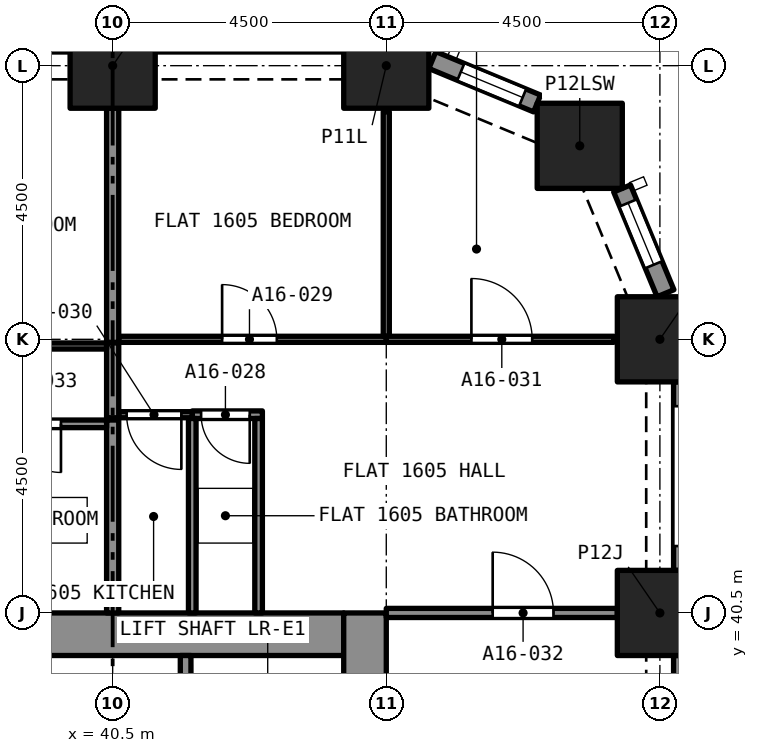
"""IFC4 building model, lengths in metres.
Left out: names, types, materials, properties, quantities, classifications, styles, units other than length and angle.
Written with IfcOpenShell. Run it as: python <this file> out.ifc"""

import sys

from ifc_helpers import new_model, si_unit, direction, frame, frame_2d, origin, origin_2d, place, context, subcontext, project, spatial, rectangle, extrude, element, fill, save


model = new_model("IFC4")
c1 = context("Model", 3, precision=1e-05, world=origin(), true_north=direction((0.0, 1.0)))
c2 = subcontext(c1, "Body", "Model", "MODEL_VIEW")
j1 = project(units=[si_unit("LENGTHUNIT", "METRE"), si_unit("PLANEANGLEUNIT", "RADIAN")], contexts=[c1])
p1 = place(None, origin())
s1 = spatial("IfcSite", under=j1, at=p1, CompositionType="ELEMENT")
p2 = place(p1, origin())
s2 = spatial("IfcBuilding", under=s1, at=p2, CompositionType="ELEMENT")
p3 = place(p2, frame((0.0, 0.0, 62.4)))
s3 = spatial("IfcBuildingStorey", under=s2, at=p3, CompositionType="ELEMENT", Elevation=62.4)
for number, where, z_axis, x_axis in (
    (1, (49.5, 40.5, 0.0), (0.0, 0.0, 1.0), (1.0, 0.0, 0.0)),
    (2, (49.5, 45.0, 0.0), (0.0, 0.0, 1.0), (1.0, 0.0, 0.0)),
    (3, (48.182, 48.182, 0.0), (0.0, 0.0, 1.0), (1.0, 0.0, 0.0)),
    (4, (40.5, 49.5, 0.0), (0.0, 0.0, 1.0), (1.0, 0.0, 0.0)),
    (5, (45.0, 49.5, 0.0), (0.0, 0.0, 1.0), (1.0, 0.0, 0.0)),
):
    element("IfcColumn", number, at=place(p3, frame(where, z_axis=z_axis, x_axis=x_axis)), inside=s3, PredefinedType="COLUMN", context=c2, shape_type="SweptSolid", body=[
        extrude(rectangle(XDim=1.4, YDim=1.4, at=origin_2d()), origin(), (0.0, 0.0, 1.0), 3.2),
    ])
p4 = place(p3, frame((36.7, 40.15, 0.0), z_axis=(0.0, 0.0, 1.0), x_axis=(1.0, 0.0, 0.0)))
e6 = element("IfcWall", 6, at=p4, inside=s3, PredefinedType="SOLIDWALL", context=c2, shape_type="SweptSolid", body=[
    extrude(rectangle(XDim=7.6, YDim=0.7, at=frame_2d((3.8, 0.0))), origin(), (0.0, 0.0, 1.0), 3.2),
])
p5 = place(p3, frame((44.65, 27.0, 0.0), z_axis=(0.0, 0.0, 1.0), x_axis=(0.0, 1.0, 0.0)))
e7 = element("IfcWall", 7, at=p5, inside=s3, PredefinedType="SOLIDWALL", context=c2, shape_type="SweptSolid", body=[
    extrude(rectangle(XDim=13.5, YDim=0.7, at=frame_2d((6.75, 0.0))), origin(), (0.0, 0.0, 1.0), 3.2),
])
p6 = place(p5, frame((8.95, 0.0, 0.0)))
e8 = element("IfcOpeningElement", 8, at=p6, cuts=e7, PredefinedType="OPENING", context=c2, shape_type="SweptSolid", body=[
    extrude(rectangle(XDim=1.2, YDim=2.1, at=frame_2d((0.6, 1.05))), frame((0.0, 0.36, 0.0), z_axis=(0.0, -1.0, 0.0), x_axis=(1.0, 0.0, 0.0)), (0.0, 0.0, 1.0), 0.72),
])
p7 = place(p3, frame((49.875, 39.8, 0.0), z_axis=(0.0, 0.0, 1.0), x_axis=(0.0, -1.0, 0.0)))
e9 = element("IfcWall", 9, at=p7, inside=s3, PredefinedType="SOLIDWALL", context=c2, shape_type="SweptSolid", body=[
    extrude(rectangle(XDim=3.1, YDim=0.3, at=frame_2d((1.55, 0.0))), origin(), (0.0, 0.0, 1.0), 3.2),
])
p8 = place(p7, frame((0.4, 0.0, 0.45)))
e10 = element("IfcOpeningElement", 10, at=p8, cuts=e9, PredefinedType="OPENING", context=c2, shape_type="SweptSolid", body=[
    extrude(rectangle(XDim=2.3, YDim=1.95, at=frame_2d((1.15, 0.975))), frame((0.0, 0.16, 0.0), z_axis=(0.0, -1.0, 0.0), x_axis=(1.0, 0.0, 0.0)), (0.0, 0.0, 1.0), 0.32),
])
p9 = place(p3, frame((49.875, 44.3, 0.0), z_axis=(0.0, 0.0, 1.0), x_axis=(0.0, -1.0, 0.0)))
e11 = element("IfcWall", 11, at=p9, inside=s3, PredefinedType="SOLIDWALL", context=c2, shape_type="SweptSolid", body=[
    extrude(rectangle(XDim=3.1, YDim=0.3, at=frame_2d((1.55, 0.0))), origin(), (0.0, 0.0, 1.0), 3.2),
])
p10 = place(p9, frame((0.4, 0.0, 0.45)))
e12 = element("IfcOpeningElement", 12, at=p10, cuts=e11, PredefinedType="OPENING", context=c2, shape_type="SweptSolid", body=[
    extrude(rectangle(XDim=2.3, YDim=1.95, at=frame_2d((1.15, 0.975))), frame((0.0, 0.16, 0.0), z_axis=(0.0, -1.0, 0.0), x_axis=(1.0, 0.0, 0.0)), (0.0, 0.0, 1.0), 0.32),
])
p11 = place(p3, frame((48.878, 47.48, 0.0), z_axis=(0.0, 0.0, 1.0), x_axis=(0.38262540684, -0.923903565336, 0.0)))
e13 = element("IfcWall", 13, at=p11, inside=s3, PredefinedType="SOLIDWALL", context=c2, shape_type="SweptSolid", body=[
    extrude(rectangle(XDim=1.865, YDim=0.3, at=frame_2d((0.933, 0.0))), origin(), (0.0, 0.0, 1.0), 3.2),
])
p12 = place(p11, frame((0.258, 0.0, 0.45)))
e14 = element("IfcOpeningElement", 14, at=p12, cuts=e13, PredefinedType="OPENING", context=c2, shape_type="SweptSolid", body=[
    extrude(rectangle(XDim=1.1, YDim=1.95, at=frame_2d((0.55, 0.975))), frame((0.0, 0.16, 0.0), z_axis=(0.0, -1.0, 0.0), x_axis=(1.0, 0.0, 0.0)), (0.0, 0.0, 1.0), 0.32),
])
p13 = place(p3, frame((45.757, 49.592, 0.0), z_axis=(0.0, 0.0, 1.0), x_axis=(0.923857286003, -0.382737135771, 0.0)))
e15 = element("IfcWall", 15, at=p13, inside=s3, PredefinedType="SOLIDWALL", context=c2, shape_type="SweptSolid", body=[
    extrude(rectangle(XDim=1.865, YDim=0.3, at=frame_2d((0.933, 0.0))), origin(), (0.0, 0.0, 1.0), 3.2),
])
p14 = place(p13, frame((0.508, 0.0, 0.45)))
e16 = element("IfcOpeningElement", 16, at=p14, cuts=e15, PredefinedType="OPENING", context=c2, shape_type="SweptSolid", body=[
    extrude(rectangle(XDim=1.1, YDim=1.95, at=frame_2d((0.55, 0.975))), frame((0.0, 0.16, 0.0), z_axis=(0.0, -1.0, 0.0), x_axis=(1.0, 0.0, 0.0)), (0.0, 0.0, 1.0), 0.32),
])
p15 = place(p3, frame((42.962, 43.76, 0.0), z_axis=(0.0, 0.0, 1.0), x_axis=(-1.0, 0.0, 0.0)))
e17 = element("IfcWall", 17, at=p15, inside=s3, PredefinedType="PARTITIONING", context=c2, shape_type="SweptSolid", body=[
    extrude(rectangle(XDim=1.153, YDim=0.125, at=frame_2d((0.577, 0.0))), origin(), (0.0, 0.0, 1.0), 2.9),
])
p16 = place(p15, frame((0.208, 0.0, 0.0)))
e18 = element("IfcOpeningElement", 18, at=p16, cuts=e17, PredefinedType="OPENING", context=c2, shape_type="SweptSolid", body=[
    extrude(rectangle(XDim=0.8, YDim=2.1, at=frame_2d((0.4, 1.05))), frame((0.0, 0.073, 0.0), z_axis=(0.0, -1.0, 0.0), x_axis=(1.0, 0.0, 0.0)), (0.0, 0.0, 1.0), 0.145),
])
for number, where, z_axis, x_axis in (
    (19, (42.9, 40.5, 0.0), (0.0, 0.0, 1.0), (0.0, 1.0, 0.0)),
    (20, (41.809, 40.5, 0.0), (0.0, 0.0, 1.0), (0.0, 1.0, 0.0)),
):
    element("IfcWall", number, at=place(p3, frame(where, z_axis=z_axis, x_axis=x_axis)), inside=s3, PredefinedType="PARTITIONING", context=c2, shape_type="SweptSolid", body=[
        extrude(rectangle(XDim=3.198, YDim=0.125, at=frame_2d((1.599, 0.0))), origin(), (0.0, 0.0, 1.0), 2.9),
    ])
p17 = place(p3, frame((40.6, 45.0, 0.0), z_axis=(0.0, 0.0, 1.0), x_axis=(1.0, 0.0, 0.0)))
e21 = element("IfcWall", 21, at=p17, inside=s3, PredefinedType="PARTITIONING", context=c2, shape_type="SweptSolid", body=[
    extrude(rectangle(XDim=4.4, YDim=0.1, at=frame_2d((2.2, 0.0))), origin(), (0.0, 0.0, 1.0), 2.9),
])
p18 = place(p17, frame((1.7, 0.0, 0.0)))
e22 = element("IfcOpeningElement", 22, at=p18, cuts=e21, PredefinedType="OPENING", context=c2, shape_type="SweptSolid", body=[
    extrude(rectangle(XDim=0.9, YDim=2.1, at=frame_2d((0.45, 1.05))), frame((0.0, 0.06, 0.0), z_axis=(0.0, -1.0, 0.0), x_axis=(1.0, 0.0, 0.0)), (0.0, 0.0, 1.0), 0.12),
])
p19 = place(p3, frame((45.0, 45.05, 0.0), z_axis=(0.0, 0.0, 1.0), x_axis=(0.0, 1.0, 0.0)))
e23 = element("IfcWall", 23, at=p19, inside=s3, PredefinedType="PARTITIONING", context=c2, shape_type="SweptSolid", body=[
    extrude(rectangle(XDim=3.692, YDim=0.1, at=frame_2d((1.846, 0.0))), origin(), (0.0, 0.0, 1.0), 2.9),
])
p20 = place(p3, frame((40.5, 44.95, 0.0), z_axis=(0.0, 0.0, 1.0), x_axis=(0.0, 1.0, 0.0)))
e24 = element("IfcWall", 24, at=p20, inside=s3, PredefinedType="PARTITIONING", context=c2, shape_type="SweptSolid", body=[
    extrude(rectangle(XDim=3.85, YDim=0.2, at=frame_2d((1.925, 0.0))), origin(), (0.0, 0.0, 1.0), 2.9),
])
p21 = place(p3, frame((41.809, 43.76, 0.0), z_axis=(0.0, 0.0, 1.0), x_axis=(-1.0, 0.0, 0.0)))
e25 = element("IfcWall", 25, at=p21, inside=s3, PredefinedType="PARTITIONING", context=c2, shape_type="SweptSolid", body=[
    extrude(rectangle(XDim=1.209, YDim=0.1, at=frame_2d((0.604, 0.0))), origin(), (0.0, 0.0, 1.0), 2.9),
])
p22 = place(p21, frame((0.179, 0.0, 0.0)))
e26 = element("IfcOpeningElement", 26, at=p22, cuts=e25, PredefinedType="OPENING", context=c2, shape_type="SweptSolid", body=[
    extrude(rectangle(XDim=0.9, YDim=2.1, at=frame_2d((0.45, 1.05))), frame((0.0, 0.06, 0.0), z_axis=(0.0, -1.0, 0.0), x_axis=(1.0, 0.0, 0.0)), (0.0, 0.0, 1.0), 0.12),
])
p23 = place(p3, frame((45.0, 45.0, 0.0), z_axis=(0.0, 0.0, 1.0), x_axis=(1.0, 0.0, 0.0)))
e27 = element("IfcWall", 27, at=p23, inside=s3, PredefinedType="PARTITIONING", context=c2, shape_type="SweptSolid", body=[
    extrude(rectangle(XDim=3.742, YDim=0.1, at=frame_2d((1.871, 0.0))), origin(), (0.0, 0.0, 1.0), 2.9),
])
p24 = place(p23, frame((1.4, 0.0, 0.0)))
e28 = element("IfcOpeningElement", 28, at=p24, cuts=e27, PredefinedType="OPENING", context=c2, shape_type="SweptSolid", body=[
    extrude(rectangle(XDim=1.0, YDim=2.1, at=frame_2d((0.5, 1.05))), frame((0.0, 0.06, 0.0), z_axis=(0.0, -1.0, 0.0), x_axis=(1.0, 0.0, 0.0)), (0.0, 0.0, 1.0), 0.12),
])
p25 = place(p3, frame((40.5, 43.71, 0.0), z_axis=(0.0, 0.0, 1.0), x_axis=(0.0, 1.0, 0.0)))
e29 = element("IfcWall", 29, at=p25, inside=s3, PredefinedType="PARTITIONING", context=c2, shape_type="SweptSolid", body=[
    extrude(rectangle(XDim=1.23, YDim=0.2, at=frame_2d((0.615, 0.0))), origin(), (0.0, 0.0, 1.0), 2.9),
])
p26 = place(p3, frame((45.0, 40.5, 0.0), z_axis=(0.0, 0.0, 1.0), x_axis=(1.0, 0.0, 0.0)))
e30 = element("IfcWall", 30, at=p26, inside=s3, PredefinedType="PARTITIONING", context=c2, shape_type="SweptSolid", body=[
    extrude(rectangle(XDim=3.8, YDim=0.15, at=frame_2d((1.9, 0.0))), origin(), (0.0, 0.0, 1.0), 2.9),
])
p27 = place(p26, frame((1.75, 0.0, 0.0)))
e31 = element("IfcOpeningElement", 31, at=p27, cuts=e30, PredefinedType="OPENING", context=c2, shape_type="SweptSolid", body=[
    extrude(rectangle(XDim=1.0, YDim=2.1, at=frame_2d((0.5, 1.05))), frame((0.0, 0.085, 0.0), z_axis=(0.0, -1.0, 0.0), x_axis=(1.0, 0.0, 0.0)), (0.0, 0.0, 1.0), 0.17),
])
p28 = place(p3, frame((40.5, 40.5, 0.0), z_axis=(0.0, 0.0, 1.0), x_axis=(0.0, 1.0, 0.0)))
e32 = element("IfcWall", 32, at=p28, inside=s3, PredefinedType="PARTITIONING", context=c2, shape_type="SweptSolid", body=[
    extrude(rectangle(XDim=3.173, YDim=0.2, at=frame_2d((1.586, 0.0))), origin(), (0.0, 0.0, 1.0), 2.9),
])
p29 = place(p3, frame((40.4, 43.61, 0.0), z_axis=(0.0, 0.0, 1.0), x_axis=(-1.0, 0.0, 0.0)))
e33 = element("IfcWall", 33, at=p29, inside=s3, PredefinedType="PARTITIONING", context=c2, shape_type="SweptSolid", body=[
    extrude(rectangle(XDim=2.4, YDim=0.125, at=frame_2d((1.2, 0.0))), origin(), (0.0, 0.0, 1.0), 2.9),
])
p30 = place(p29, frame((0.75, 0.0, 0.0)))
e34 = element("IfcOpeningElement", 34, at=p30, cuts=e33, PredefinedType="OPENING", context=c2, shape_type="SweptSolid", body=[
    extrude(rectangle(XDim=0.8, YDim=2.1, at=frame_2d((0.4, 1.05))), frame((0.0, 0.073, 0.0), z_axis=(0.0, -1.0, 0.0), x_axis=(1.0, 0.0, 0.0)), (0.0, 0.0, 1.0), 0.145),
])
p31 = place(p3, frame((36.0, 44.89, 0.0), z_axis=(0.0, 0.0, 1.0), x_axis=(1.0, 0.0, 0.0)))
e35 = element("IfcWall", 35, at=p31, inside=s3, PredefinedType="PARTITIONING", context=c2, shape_type="SweptSolid", body=[
    extrude(rectangle(XDim=4.4, YDim=0.1, at=frame_2d((2.2, 0.0))), origin(), (0.0, 0.0, 1.0), 2.9),
])
p32 = place(p31, frame((1.8, 0.0, 0.0)))
e36 = element("IfcOpeningElement", 36, at=p32, cuts=e35, PredefinedType="OPENING", context=c2, shape_type="SweptSolid", body=[
    extrude(rectangle(XDim=0.9, YDim=2.1, at=frame_2d((0.45, 1.05))), frame((0.0, 0.06, 0.0), z_axis=(0.0, -1.0, 0.0), x_axis=(1.0, 0.0, 0.0)), (0.0, 0.0, 1.0), 0.12),
])
p33 = place(p3, frame((41.7, 37.5, 0.0), z_axis=(0.0, 0.0, 1.0), x_axis=(0.0, 1.0, 0.0)))
e37 = element("IfcWall", 37, at=p33, inside=s3, PredefinedType="SOLIDWALL", context=c2, shape_type="SweptSolid", body=[
    extrude(rectangle(XDim=2.3, YDim=0.175, at=frame_2d((1.15, 0.0))), origin(), (0.0, 0.0, 1.0), 2.9),
])
p34 = place(p12, origin())
e38 = element("IfcWindow", 38, at=p34, inside=s3, PartitioningType="SINGLE_PANEL", PredefinedType="WINDOW", context=c2, shape_type="SweptSolid", body=[
    extrude(rectangle(XDim=1.1, YDim=1.95, at=frame_2d((0.55, 0.975))), frame((0.0, 0.03, 0.0), z_axis=(0.0, -1.0, 0.0), x_axis=(1.0, 0.0, 0.0)), (0.0, 0.0, 1.0), 0.06),
])
fill(e14, e38)
p35 = place(p14, origin())
e39 = element("IfcWindow", 39, at=p35, inside=s3, PartitioningType="SINGLE_PANEL", PredefinedType="WINDOW", context=c2, shape_type="SweptSolid", body=[
    extrude(rectangle(XDim=1.1, YDim=1.95, at=frame_2d((0.55, 0.975))), frame((0.0, 0.03, 0.0), z_axis=(0.0, -1.0, 0.0), x_axis=(1.0, 0.0, 0.0)), (0.0, 0.0, 1.0), 0.06),
])
fill(e16, e39)
p36 = place(p16, origin())
e40 = element("IfcDoor", 40, at=p36, inside=s3, OperationType="SINGLE_SWING_RIGHT", PredefinedType="DOOR", context=c2, shape_type="SweptSolid", body=[
    extrude(rectangle(XDim=0.8, YDim=2.1, at=frame_2d((0.4, 1.05))), frame((0.0, 0.025, 0.0), z_axis=(0.0, -1.0, 0.0), x_axis=(1.0, 0.0, 0.0)), (0.0, 0.0, 1.0), 0.05),
])
fill(e18, e40)
p37 = place(p18, origin())
e41 = element("IfcDoor", 41, at=p37, inside=s3, OperationType="SINGLE_SWING_LEFT", PredefinedType="DOOR", context=c2, shape_type="SweptSolid", body=[
    extrude(rectangle(XDim=0.9, YDim=2.1, at=frame_2d((0.45, 1.05))), frame((0.0, 0.025, 0.0), z_axis=(0.0, -1.0, 0.0), x_axis=(1.0, 0.0, 0.0)), (0.0, 0.0, 1.0), 0.05),
])
fill(e22, e41)
p38 = place(p22, origin())
e42 = element("IfcDoor", 42, at=p38, inside=s3, OperationType="SINGLE_SWING_RIGHT", PredefinedType="DOOR", context=c2, shape_type="SweptSolid", body=[
    extrude(rectangle(XDim=0.9, YDim=2.1, at=frame_2d((0.45, 1.05))), frame((0.0, 0.025, 0.0), z_axis=(0.0, -1.0, 0.0), x_axis=(1.0, 0.0, 0.0)), (0.0, 0.0, 1.0), 0.05),
])
fill(e26, e42)
p39 = place(p24, origin())
e43 = element("IfcDoor", 43, at=p39, inside=s3, OperationType="SINGLE_SWING_RIGHT", PredefinedType="DOOR", context=c2, shape_type="SweptSolid", body=[
    extrude(rectangle(XDim=1.0, YDim=2.1, at=frame_2d((0.5, 1.05))), frame((0.0, 0.025, 0.0), z_axis=(0.0, -1.0, 0.0), x_axis=(1.0, 0.0, 0.0)), (0.0, 0.0, 1.0), 0.05),
])
fill(e28, e43)
p40 = place(p27, origin())
e44 = element("IfcDoor", 44, at=p40, inside=s3, OperationType="SINGLE_SWING_RIGHT", PredefinedType="DOOR", context=c2, shape_type="SweptSolid", body=[
    extrude(rectangle(XDim=1.0, YDim=2.1, at=frame_2d((0.5, 1.05))), frame((0.0, 0.025, 0.0), z_axis=(0.0, -1.0, 0.0), x_axis=(1.0, 0.0, 0.0)), (0.0, 0.0, 1.0), 0.05),
])
fill(e31, e44)
p41 = place(p30, origin())
e45 = element("IfcDoor", 45, at=p41, inside=s3, OperationType="SINGLE_SWING_LEFT", PredefinedType="DOOR", context=c2, shape_type="SweptSolid", body=[
    extrude(rectangle(XDim=0.8, YDim=2.1, at=frame_2d((0.4, 1.05))), frame((0.0, 0.025, 0.0), z_axis=(0.0, -1.0, 0.0), x_axis=(1.0, 0.0, 0.0)), (0.0, 0.0, 1.0), 0.05),
])
fill(e34, e45)
save(model, sys.argv[1])
